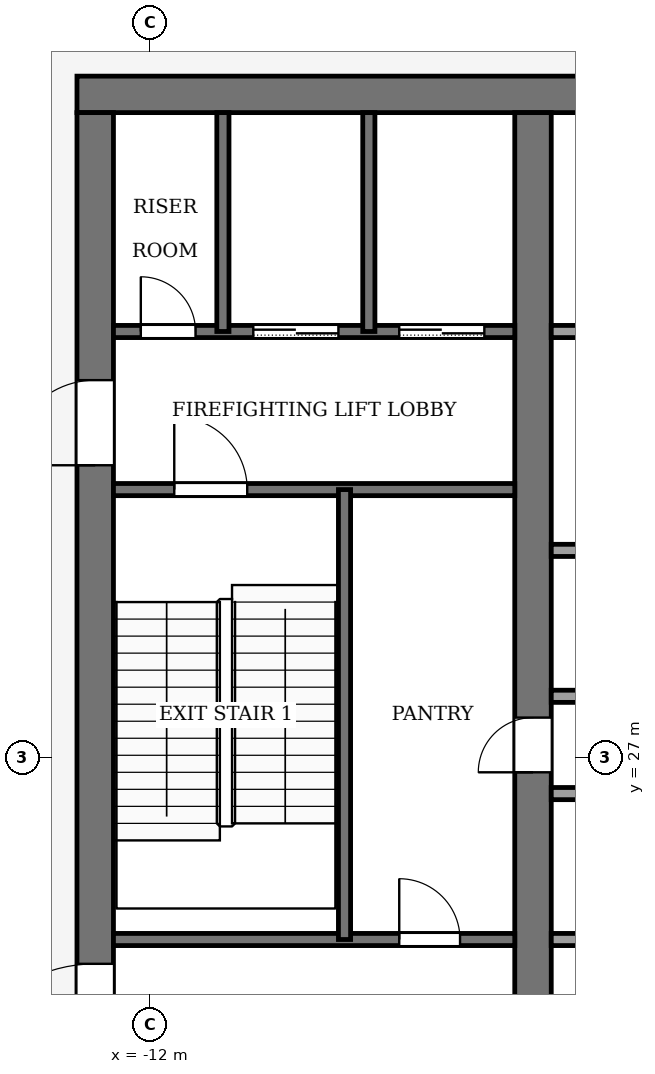
"""IFC4 building model, lengths in metres.
Left out: names, types, materials, properties, quantities, classifications, styles, units other than length and angle.
Written with IfcOpenShell. Run it as: python <this file> out.ifc"""

import sys

from ifc_helpers import new_model, si_unit, direction, frame, frame_2d, origin, place, context, subcontext, project, spatial, rectangle, extrude, element, fill, save


model = new_model("IFC4")
c1 = context("Model", 3, precision=1e-05, world=origin(), true_north=direction((0.0, 1.0)))
c2 = subcontext(c1, "Body", "Model", "MODEL_VIEW")
j1 = project(units=[si_unit("LENGTHUNIT", "METRE"), si_unit("PLANEANGLEUNIT", "RADIAN")], contexts=[c1])
p1 = place(None, origin())
s1 = spatial("IfcSite", under=j1, at=p1, CompositionType="ELEMENT")
p2 = place(p1, origin())
s2 = spatial("IfcBuilding", under=s1, at=p2, CompositionType="ELEMENT")
p3 = place(p2, frame((0.0, 0.0, 289.0)))
s3 = spatial("IfcBuildingStorey", under=s2, at=p3, CompositionType="ELEMENT", Elevation=289.0)
p4 = place(p3, frame((-13.2, 37.9, -0.13), z_axis=(0.0, 0.0, 1.0), x_axis=(1.0, 0.0, 0.0)))
e1 = element("IfcWall", 1, at=p4, inside=s3, PredefinedType="SHEAR", context=c2, shape_type="SweptSolid", body=[
    extrude(rectangle(XDim=26.4, YDim=0.6, at=frame_2d((13.2, 0.0))), origin(), (0.0, 0.0, 1.0), 5.0),
])
p5 = place(p3, frame((-12.9, 18.4, -0.13), z_axis=(0.0, 0.0, 1.0), x_axis=(0.0, 1.0, 0.0)))
e2 = element("IfcWall", 2, at=p5, inside=s3, PredefinedType="SHEAR", context=c2, shape_type="SweptSolid", body=[
    extrude(rectangle(XDim=19.2, YDim=0.6, at=frame_2d((9.6, 0.0))), origin(), (0.0, 0.0, 1.0), 5.0),
])
p6 = place(p5, frame((2.8, 0.0, 0.13)))
e3 = element("IfcOpeningElement", 3, at=p6, cuts=e2, PredefinedType="OPENING", context=c2, shape_type="SweptSolid", body=[
    extrude(rectangle(XDim=2.4, YDim=2.4, at=frame_2d((1.2, 1.2))), frame((0.0, 0.31, 0.0), z_axis=(0.0, -1.0, 0.0), x_axis=(1.0, 0.0, 0.0)), (0.0, 0.0, 1.0), 0.62),
])
p7 = place(p5, frame((13.4, 0.0, 0.13)))
e4 = element("IfcOpeningElement", 4, at=p7, cuts=e2, PredefinedType="OPENING", context=c2, shape_type="SweptSolid", body=[
    extrude(rectangle(XDim=1.4, YDim=2.2, at=frame_2d((0.7, 1.1))), frame((0.0, 0.31, 0.0), z_axis=(0.0, -1.0, 0.0), x_axis=(1.0, 0.0, 0.0)), (0.0, 0.0, 1.0), 0.62),
])
p8 = place(p3, frame((-5.7, 18.4, -0.13), z_axis=(0.0, 0.0, 1.0), x_axis=(0.0, 1.0, 0.0)))
e5 = element("IfcWall", 5, at=p8, inside=s3, PredefinedType="SHEAR", context=c2, shape_type="SweptSolid", body=[
    extrude(rectangle(XDim=19.2, YDim=0.6, at=frame_2d((9.6, 0.0))), origin(), (0.0, 0.0, 1.0), 5.0),
])
p9 = place(p8, frame((8.35, 0.0, 0.13)))
e6 = element("IfcOpeningElement", 6, at=p9, cuts=e5, PredefinedType="OPENING", context=c2, shape_type="SweptSolid", body=[
    extrude(rectangle(XDim=0.9, YDim=2.1, at=frame_2d((0.45, 1.05))), frame((0.0, 0.31, 0.0), z_axis=(0.0, -1.0, 0.0), x_axis=(1.0, 0.0, 0.0)), (0.0, 0.0, 1.0), 0.62),
])
p10 = place(p3, frame((-12.6, 24.0, 0.0), z_axis=(0.0, 0.0, 1.0), x_axis=(1.0, 0.0, 0.0)))
e7 = element("IfcWall", 7, at=p10, inside=s3, PredefinedType="PARTITIONING", context=c2, shape_type="SweptSolid", body=[
    extrude(rectangle(XDim=6.6, YDim=0.2, at=frame_2d((3.3, 0.0))), origin(), (0.0, 0.0, 1.0), 4.87),
])
p11 = place(p10, frame((4.7, 0.0, 0.0)))
e8 = element("IfcOpeningElement", 8, at=p11, cuts=e7, PredefinedType="OPENING", context=c2, shape_type="SweptSolid", body=[
    extrude(rectangle(XDim=1.0, YDim=2.1, at=frame_2d((0.5, 1.05))), frame((0.0, 0.11, 0.0), z_axis=(0.0, -1.0, 0.0), x_axis=(1.0, 0.0, 0.0)), (0.0, 0.0, 1.0), 0.22),
])
p12 = place(p3, frame((-5.4, 24.0, 0.0), z_axis=(0.0, 0.0, 1.0), x_axis=(1.0, 0.0, 0.0)))
e9 = element("IfcWall", 9, at=p12, inside=s3, PredefinedType="PARTITIONING", context=c2, shape_type="SweptSolid", body=[
    extrude(rectangle(XDim=10.8, YDim=0.2, at=frame_2d((5.4, 0.0))), origin(), (0.0, 0.0, 1.0), 4.87),
])
p13 = place(p12, frame((2.632, 0.0, 0.0)))
e10 = element("IfcOpeningElement", 10, at=p13, cuts=e9, PredefinedType="OPENING", context=c2, shape_type="SweptSolid", body=[
    extrude(rectangle(XDim=1.0, YDim=2.1, at=frame_2d((0.5, 1.05))), frame((0.0, 0.11, 0.0), z_axis=(0.0, -1.0, 0.0), x_axis=(1.0, 0.0, 0.0)), (0.0, 0.0, 1.0), 0.22),
])
p14 = place(p12, frame((8.032, 0.0, 0.0)))
e11 = element("IfcOpeningElement", 11, at=p14, cuts=e9, PredefinedType="OPENING", context=c2, shape_type="SweptSolid", body=[
    extrude(rectangle(XDim=1.0, YDim=2.1, at=frame_2d((0.5, 1.05))), frame((0.0, 0.11, 0.0), z_axis=(0.0, -1.0, 0.0), x_axis=(1.0, 0.0, 0.0)), (0.0, 0.0, 1.0), 0.22),
])
for number, where, z_axis, x_axis in (
    (12, (-5.4, 26.4, 0.0), (0.0, 0.0, 1.0), (1.0, 0.0, 0.0)),
    (13, (-5.4, 28.0, 0.0), (0.0, 0.0, 1.0), (1.0, 0.0, 0.0)),
):
    element("IfcWall", number, at=place(p3, frame(where, z_axis=z_axis, x_axis=x_axis)), inside=s3, PredefinedType="PARTITIONING", context=c2, shape_type="SweptSolid", body=[
        extrude(rectangle(XDim=10.8, YDim=0.2, at=frame_2d((5.4, 0.0))), origin(), (0.0, 0.0, 1.0), 4.87),
    ])
p15 = place(p3, frame((-5.4, 30.4, 0.0), z_axis=(0.0, 0.0, 1.0), x_axis=(1.0, 0.0, 0.0)))
e14 = element("IfcWall", 14, at=p15, inside=s3, PredefinedType="PARTITIONING", context=c2, shape_type="SweptSolid", body=[
    extrude(rectangle(XDim=10.8, YDim=0.2, at=frame_2d((5.4, 0.0))), origin(), (0.0, 0.0, 1.0), 4.87),
])
p16 = place(p15, frame((2.848, 0.0, 0.0)))
e15 = element("IfcOpeningElement", 15, at=p16, cuts=e14, PredefinedType="OPENING", context=c2, shape_type="SweptSolid", body=[
    extrude(rectangle(XDim=1.0, YDim=2.1, at=frame_2d((0.5, 1.05))), frame((0.0, 0.11, 0.0), z_axis=(0.0, -1.0, 0.0), x_axis=(1.0, 0.0, 0.0)), (0.0, 0.0, 1.0), 0.22),
])
p17 = place(p15, frame((8.248, 0.0, 0.0)))
e16 = element("IfcOpeningElement", 16, at=p17, cuts=e14, PredefinedType="OPENING", context=c2, shape_type="SweptSolid", body=[
    extrude(rectangle(XDim=1.0, YDim=2.1, at=frame_2d((0.5, 1.05))), frame((0.0, 0.11, 0.0), z_axis=(0.0, -1.0, 0.0), x_axis=(1.0, 0.0, 0.0)), (0.0, 0.0, 1.0), 0.22),
])
p18 = place(p3, frame((-12.6, 31.4, 0.0), z_axis=(0.0, 0.0, 1.0), x_axis=(1.0, 0.0, 0.0)))
e17 = element("IfcWall", 17, at=p18, inside=s3, PredefinedType="PARTITIONING", context=c2, shape_type="SweptSolid", body=[
    extrude(rectangle(XDim=6.6, YDim=0.2, at=frame_2d((3.3, 0.0))), origin(), (0.0, 0.0, 1.0), 4.87),
])
p19 = place(p18, frame((1.0, 0.0, 0.0)))
e18 = element("IfcOpeningElement", 18, at=p19, cuts=e17, PredefinedType="OPENING", context=c2, shape_type="SweptSolid", body=[
    extrude(rectangle(XDim=1.2, YDim=2.2, at=frame_2d((0.6, 1.1))), frame((0.0, 0.11, 0.0), z_axis=(0.0, -1.0, 0.0), x_axis=(1.0, 0.0, 0.0)), (0.0, 0.0, 1.0), 0.22),
])
p20 = place(p3, frame((-12.6, 34.0, 0.0), z_axis=(0.0, 0.0, 1.0), x_axis=(1.0, 0.0, 0.0)))
e19 = element("IfcWall", 19, at=p20, inside=s3, PredefinedType="PARTITIONING", context=c2, shape_type="SweptSolid", body=[
    extrude(rectangle(XDim=6.6, YDim=0.2, at=frame_2d((3.3, 0.0))), origin(), (0.0, 0.0, 1.0), 4.87),
])
p21 = place(p20, frame((4.7, 0.0, 0.0)))
e20 = element("IfcOpeningElement", 20, at=p21, cuts=e19, PredefinedType="OPENING", context=c2, shape_type="SweptSolid", body=[
    extrude(rectangle(XDim=1.4, YDim=2.2, at=frame_2d((0.7, 1.1))), frame((0.0, 0.11, 0.0), z_axis=(0.0, -1.0, 0.0), x_axis=(1.0, 0.0, 0.0)), (0.0, 0.0, 1.0), 0.22),
])
p22 = place(p20, frame((2.3, 0.0, 0.0)))
e21 = element("IfcOpeningElement", 21, at=p22, cuts=e19, PredefinedType="OPENING", context=c2, shape_type="SweptSolid", body=[
    extrude(rectangle(XDim=1.4, YDim=2.2, at=frame_2d((0.7, 1.1))), frame((0.0, 0.11, 0.0), z_axis=(0.0, -1.0, 0.0), x_axis=(1.0, 0.0, 0.0)), (0.0, 0.0, 1.0), 0.22),
])
p23 = place(p20, frame((0.45, 0.0, 0.0)))
e22 = element("IfcOpeningElement", 22, at=p23, cuts=e19, PredefinedType="OPENING", context=c2, shape_type="SweptSolid", body=[
    extrude(rectangle(XDim=0.9, YDim=2.1, at=frame_2d((0.45, 1.05))), frame((0.0, 0.11, 0.0), z_axis=(0.0, -1.0, 0.0), x_axis=(1.0, 0.0, 0.0)), (0.0, 0.0, 1.0), 0.22),
])
p24 = place(p3, frame((-5.4, 34.0, 0.0), z_axis=(0.0, 0.0, 1.0), x_axis=(1.0, 0.0, 0.0)))
e23 = element("IfcWall", 23, at=p24, inside=s3, PredefinedType="PARTITIONING", context=c2, shape_type="SweptSolid", body=[
    extrude(rectangle(XDim=10.8, YDim=0.2, at=frame_2d((5.4, 0.0))), origin(), (0.0, 0.0, 1.0), 4.87),
])
p25 = place(p24, frame((6.15, 0.0, 0.0)))
e24 = element("IfcOpeningElement", 24, at=p25, cuts=e23, PredefinedType="OPENING", context=c2, shape_type="SweptSolid", body=[
    extrude(rectangle(XDim=1.2, YDim=2.2, at=frame_2d((0.6, 1.1))), frame((0.0, 0.11, 0.0), z_axis=(0.0, -1.0, 0.0), x_axis=(1.0, 0.0, 0.0)), (0.0, 0.0, 1.0), 0.22),
])
p26 = place(p24, frame((8.95, 0.0, 0.0)))
e25 = element("IfcOpeningElement", 25, at=p26, cuts=e23, PredefinedType="OPENING", context=c2, shape_type="SweptSolid", body=[
    extrude(rectangle(XDim=1.0, YDim=2.1, at=frame_2d((0.5, 1.05))), frame((0.0, 0.11, 0.0), z_axis=(0.0, -1.0, 0.0), x_axis=(1.0, 0.0, 0.0)), (0.0, 0.0, 1.0), 0.22),
])
p27 = place(p3, frame((-10.8, 34.0, 0.0), z_axis=(0.0, 0.0, 1.0), x_axis=(0.0, 1.0, 0.0)))
e26 = element("IfcWall", 26, at=p27, inside=s3, PredefinedType="PARTITIONING", context=c2, shape_type="SweptSolid", body=[
    extrude(rectangle(XDim=3.6, YDim=0.2, at=frame_2d((1.8, 0.0))), origin(), (0.0, 0.0, 1.0), 4.87),
])
p28 = place(p3, frame((-8.8, 24.0, 0.0), z_axis=(0.0, 0.0, 1.0), x_axis=(0.0, 1.0, 0.0)))
e27 = element("IfcWall", 27, at=p28, inside=s3, PredefinedType="PARTITIONING", context=c2, shape_type="SweptSolid", body=[
    extrude(rectangle(XDim=7.4, YDim=0.2, at=frame_2d((3.7, 0.0))), origin(), (0.0, 0.0, 1.0), 4.87),
])
p29 = place(p3, frame((-8.4, 34.0, 0.0), z_axis=(0.0, 0.0, 1.0), x_axis=(0.0, 1.0, 0.0)))
e28 = element("IfcWall", 28, at=p29, inside=s3, PredefinedType="PARTITIONING", context=c2, shape_type="SweptSolid", body=[
    extrude(rectangle(XDim=3.6, YDim=0.2, at=frame_2d((1.8, 0.0))), origin(), (0.0, 0.0, 1.0), 4.87),
])
p30 = place(p21, origin())
e29 = element("IfcDoor", 29, at=p30, inside=s3, OperationType="SLIDING_TO_LEFT", PredefinedType="DOOR", context=c2, shape_type="SweptSolid", body=[
    extrude(rectangle(XDim=1.4, YDim=2.2, at=frame_2d((0.7, 1.1))), frame((0.0, 0.025, 0.0), z_axis=(0.0, -1.0, 0.0), x_axis=(1.0, 0.0, 0.0)), (0.0, 0.0, 1.0), 0.05),
])
fill(e20, e29)
p31 = place(p22, origin())
e30 = element("IfcDoor", 30, at=p31, inside=s3, OperationType="SLIDING_TO_LEFT", PredefinedType="DOOR", context=c2, shape_type="SweptSolid", body=[
    extrude(rectangle(XDim=1.4, YDim=2.2, at=frame_2d((0.7, 1.1))), frame((0.0, 0.025, 0.0), z_axis=(0.0, -1.0, 0.0), x_axis=(1.0, 0.0, 0.0)), (0.0, 0.0, 1.0), 0.05),
])
fill(e21, e30)
p32 = place(p23, origin())
e31 = element("IfcDoor", 31, at=p32, inside=s3, OperationType="SINGLE_SWING_RIGHT", PredefinedType="DOOR", context=c2, shape_type="SweptSolid", body=[
    extrude(rectangle(XDim=0.9, YDim=2.1, at=frame_2d((0.45, 1.05))), frame((0.0, 0.025, 0.0), z_axis=(0.0, -1.0, 0.0), x_axis=(1.0, 0.0, 0.0)), (0.0, 0.0, 1.0), 0.05),
])
fill(e22, e31)
p33 = place(p11, origin())
e32 = element("IfcDoor", 32, at=p33, inside=s3, OperationType="SINGLE_SWING_RIGHT", PredefinedType="DOOR", context=c2, shape_type="SweptSolid", body=[
    extrude(rectangle(XDim=1.0, YDim=2.1, at=frame_2d((0.5, 1.05))), frame((0.0, 0.025, 0.0), z_axis=(0.0, -1.0, 0.0), x_axis=(1.0, 0.0, 0.0)), (0.0, 0.0, 1.0), 0.05),
])
fill(e8, e32)
p34 = place(p9, origin())
e33 = element("IfcDoor", 33, at=p34, inside=s3, OperationType="SINGLE_SWING_LEFT", PredefinedType="DOOR", context=c2, shape_type="SweptSolid", body=[
    extrude(rectangle(XDim=0.9, YDim=2.1, at=frame_2d((0.45, 1.05))), frame((0.0, 0.025, 0.0), z_axis=(0.0, -1.0, 0.0), x_axis=(1.0, 0.0, 0.0)), (0.0, 0.0, 1.0), 0.05),
])
fill(e6, e33)
p35 = place(p19, origin())
e34 = element("IfcDoor", 34, at=p35, inside=s3, OperationType="SINGLE_SWING_LEFT", PredefinedType="DOOR", context=c2, shape_type="SweptSolid", body=[
    extrude(rectangle(XDim=1.2, YDim=2.2, at=frame_2d((0.6, 1.1))), frame((0.0, 0.025, 0.0), z_axis=(0.0, -1.0, 0.0), x_axis=(1.0, 0.0, 0.0)), (0.0, 0.0, 1.0), 0.05),
])
fill(e18, e34)
p36 = place(p6, origin())
e35 = element("IfcDoor", 35, at=p36, inside=s3, OperationType="DOUBLE_DOOR_SINGLE_SWING", PredefinedType="DOOR", context=c2, shape_type="SweptSolid", body=[
    extrude(rectangle(XDim=2.4, YDim=2.4, at=frame_2d((1.2, 1.2))), frame((0.0, 0.025, 0.0), z_axis=(0.0, -1.0, 0.0), x_axis=(1.0, 0.0, 0.0)), (0.0, 0.0, 1.0), 0.05),
])
fill(e3, e35)
p37 = place(p7, origin())
e36 = element("IfcDoor", 36, at=p37, inside=s3, OperationType="SINGLE_SWING_LEFT", PredefinedType="DOOR", context=c2, shape_type="SweptSolid", body=[
    extrude(rectangle(XDim=1.4, YDim=2.2, at=frame_2d((0.7, 1.1))), frame((0.0, 0.025, 0.0), z_axis=(0.0, -1.0, 0.0), x_axis=(1.0, 0.0, 0.0)), (0.0, 0.0, 1.0), 0.05),
])
fill(e4, e36)
save(model, sys.argv[1])
